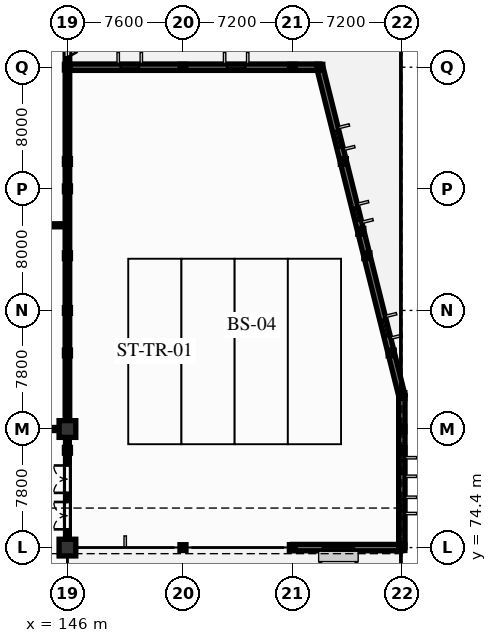
"""IFC4 building model, lengths in metres.
Left out: names, types, materials, properties, quantities, classifications, styles, units other than length and angle.
Written with IfcOpenShell. Run it as: python <this file> out.ifc"""

import sys

from ifc_helpers import new_model, si_unit, direction, frame, frame_2d, origin, origin_2d, place, context, subcontext, project, spatial, rectangle, i_section, extrude, element, fill, save


model = new_model("IFC4")
c1 = context("Model", 3, precision=1e-05, world=origin(), true_north=direction((0.0, 1.0)))
c2 = subcontext(c1, "Body", "Model", "MODEL_VIEW")
j1 = project(units=[si_unit("LENGTHUNIT", "METRE"), si_unit("PLANEANGLEUNIT", "RADIAN")], contexts=[c1])
p1 = place(None, origin())
s1 = spatial("IfcSite", under=j1, at=p1, CompositionType="ELEMENT")
p2 = place(p1, origin())
s2 = spatial("IfcBuilding", under=s1, at=p2, CompositionType="ELEMENT")
p3 = place(p2, origin())
s3 = spatial("IfcBuildingStorey", under=s2, at=p3, CompositionType="ELEMENT", Elevation=0.0)
for number, where, z_axis, x_axis in (
    (1, (146.0, 74.4, 0.0), (0.0, 0.0, 1.0), (1.0, 0.0, 0.0)),
    (2, (146.0, 82.2, 0.0), (0.0, 0.0, 1.0), (1.0, 0.0, 0.0)),
):
    element("IfcColumn", number, at=place(p3, frame(where, z_axis=z_axis, x_axis=x_axis)), inside=s3, PredefinedType="COLUMN", context=c2, shape_type="SweptSolid", body=[
        extrude(rectangle(XDim=1.1, YDim=1.1, at=origin_2d()), origin(), (0.0, 0.0, 1.0), 5.1),
    ])
for number, where, z_axis, x_axis in (
    (3, (146.0, 90.0, 0.0), (0.0, 0.0, 1.0), (1.0, 0.0, 0.0)),
    (4, (146.0, 98.0, 0.0), (0.0, 0.0, 1.0), (1.0, 0.0, 0.0)),
    (5, (146.0, 106.0, 0.0), (0.0, 0.0, 1.0), (1.0, 0.0, 0.0)),
    (6, (153.6, 74.4, 0.0), (0.0, 0.0, 1.0), (1.0, 0.0, 0.0)),
    (7, (153.6, 106.0, 0.0), (0.0, 0.0, 1.0), (1.0, 0.0, 0.0)),
    (8, (160.8, 74.4, 0.0), (0.0, 0.0, 1.0), (1.0, 0.0, 0.0)),
    (9, (160.8, 106.0, 0.0), (0.0, 0.0, 1.0), (1.0, 0.0, 0.0)),
    (10, (162.6, 106.0, 0.0), (0.0, 0.0, 1.0), (1.0, 0.0, 0.0)),
    (11, (165.3, 95.2, 0.0), (0.0, 0.0, 1.0), (1.0, 0.0, 0.0)),
    (12, (168.0, 74.4, 0.0), (0.0, 0.0, 1.0), (1.0, 0.0, 0.0)),
    (13, (168.0, 82.2, 0.0), (0.0, 0.0, 1.0), (1.0, 0.0, 0.0)),
    (14, (168.0, 84.4, 0.0), (0.0, 0.0, 1.0), (1.0, 0.0, 0.0)),
    (15, (146.0, 80.8, 0.0), (0.0, 0.0, 1.0), (1.0, 0.0, 0.0)),
    (16, (168.0, 80.8, 0.0), (0.0, 0.0, 1.0), (1.0, 0.0, 0.0)),
    (17, (146.0, 87.2, 0.0), (0.0, 0.0, 1.0), (1.0, 0.0, 0.0)),
    (18, (167.3, 87.2, 0.0), (0.0, 0.0, 1.0), (1.0, 0.0, 0.0)),
    (19, (146.0, 93.6, 0.0), (0.0, 0.0, 1.0), (1.0, 0.0, 0.0)),
    (20, (165.7, 93.6, 0.0), (0.0, 0.0, 1.0), (1.0, 0.0, 0.0)),
    (21, (146.0, 99.8, 0.0), (0.0, 0.0, 1.0), (1.0, 0.0, 0.0)),
    (22, (164.15, 99.8, 0.0), (0.0, 0.0, 1.0), (1.0, 0.0, 0.0)),
):
    element("IfcColumn", number, at=place(p3, frame(where, z_axis=z_axis, x_axis=x_axis)), inside=s3, PredefinedType="COLUMN", context=c2, shape_type="SweptSolid", body=[
        extrude(i_section(OverallWidth=0.396, OverallDepth=0.381, WebThickness=0.019, FlangeThickness=0.03, at=origin_2d()), origin(), (0.0, 0.0, 1.0), 5.1),
    ])
p4 = place(p3, frame((146.0, 82.2, 0.0), z_axis=(0.0, 0.0, 1.0), x_axis=(0.0, 1.0, 0.0)))
e23 = element("IfcWall", 23, at=p4, inside=s3, PredefinedType="SOLIDWALL", context=c2, shape_type="SweptSolid", body=[
    extrude(rectangle(XDim=31.8, YDim=0.3, at=frame_2d((15.9, 0.0))), origin(), (0.0, 0.0, 1.0), 4.145),
])
p5 = place(p4, frame((24.45, 0.0, 0.0)))
e24 = element("IfcOpeningElement", 24, at=p5, cuts=e23, PredefinedType="OPENING", context=c2, shape_type="SweptSolid", body=[
    extrude(rectangle(XDim=3.2, YDim=3.6, at=frame_2d((1.6, 1.8))), frame((0.0, 0.16, 0.0), z_axis=(0.0, -1.0, 0.0), x_axis=(1.0, 0.0, 0.0)), (0.0, 0.0, 1.0), 0.32),
])
p6 = place(p4, frame((28.0, 0.0, 0.0)))
e25 = element("IfcOpeningElement", 25, at=p6, cuts=e23, PredefinedType="OPENING", context=c2, shape_type="SweptSolid", body=[
    extrude(rectangle(XDim=3.2, YDim=3.6, at=frame_2d((1.6, 1.8))), frame((0.0, 0.16, 0.0), z_axis=(0.0, -1.0, 0.0), x_axis=(1.0, 0.0, 0.0)), (0.0, 0.0, 1.0), 0.32),
])
p7 = place(p3, frame((160.8, 74.4, 0.0), z_axis=(0.0, 0.0, 1.0), x_axis=(1.0, 0.0, 0.0)))
e26 = element("IfcWall", 26, at=p7, inside=s3, PredefinedType="SOLIDWALL", context=c2, shape_type="SweptSolid", body=[
    extrude(rectangle(XDim=7.2, YDim=0.42, at=frame_2d((3.6, 0.0))), origin(), (0.0, 0.0, 1.0), 4.8),
])
p8 = place(p7, frame((2.0, 0.0, 0.9)))
e27 = element("IfcOpeningElement", 27, at=p8, cuts=e26, PredefinedType="OPENING", context=c2, shape_type="SweptSolid", body=[
    extrude(rectangle(XDim=2.05, YDim=1.85, at=frame_2d((1.025, 0.925))), frame((0.0, 0.22, 0.0), z_axis=(0.0, -1.0, 0.0), x_axis=(1.0, 0.0, 0.0)), (0.0, 0.0, 1.0), 0.44),
])
p9 = place(p3, frame((168.0, 74.4, 0.0), z_axis=(0.0, 0.0, 1.0), x_axis=(0.0, 1.0, 0.0)))
e28 = element("IfcWall", 28, at=p9, inside=s3, PredefinedType="SOLIDWALL", context=c2, shape_type="SweptSolid", body=[
    extrude(rectangle(XDim=10.0, YDim=0.42, at=frame_2d((5.0, 0.0))), origin(), (0.0, 0.0, 1.0), 4.8),
])
p10 = place(p9, frame((2.4, 0.0, 1.0)))
e29 = element("IfcOpeningElement", 29, at=p10, cuts=e28, PredefinedType="OPENING", context=c2, shape_type="SweptSolid", body=[
    extrude(rectangle(XDim=0.75, YDim=2.2, at=frame_2d((0.375, 1.1))), frame((0.0, 0.22, 0.0), z_axis=(0.0, -1.0, 0.0), x_axis=(1.0, 0.0, 0.0)), (0.0, 0.0, 1.0), 0.44),
])
p11 = place(p9, frame((4.85, 0.0, 1.0)))
e30 = element("IfcOpeningElement", 30, at=p11, cuts=e28, PredefinedType="OPENING", context=c2, shape_type="SweptSolid", body=[
    extrude(rectangle(XDim=0.9, YDim=2.2, at=frame_2d((0.45, 1.1))), frame((0.0, 0.22, 0.0), z_axis=(0.0, -1.0, 0.0), x_axis=(1.0, 0.0, 0.0)), (0.0, 0.0, 1.0), 0.44),
])
p12 = place(p3, frame((168.0, 84.4, 0.0), z_axis=(0.0, 0.0, 1.0), x_axis=(-0.242530464893, 0.970143790167, 0.0)))
e31 = element("IfcWall", 31, at=p12, inside=s3, PredefinedType="SOLIDWALL", context=c2, shape_type="SweptSolid", body=[
    extrude(rectangle(XDim=22.265, YDim=0.42, at=frame_2d((11.132, 0.0))), origin(), (0.0, 0.0, 1.0), 4.8),
])
p13 = place(p12, frame((4.0, 0.0, 1.0)))
e32 = element("IfcOpeningElement", 32, at=p13, cuts=e31, PredefinedType="OPENING", context=c2, shape_type="SweptSolid", body=[
    extrude(rectangle(XDim=1.15, YDim=2.3, at=frame_2d((0.575, 1.15))), frame((0.0, 0.22, 0.0), z_axis=(0.0, -1.0, 0.0), x_axis=(1.0, 0.0, 0.0)), (0.0, 0.0, 1.0), 0.44),
])
p14 = place(p12, frame((11.85, 0.0, 1.0)))
e33 = element("IfcOpeningElement", 33, at=p14, cuts=e31, PredefinedType="OPENING", context=c2, shape_type="SweptSolid", body=[
    extrude(rectangle(XDim=0.9, YDim=2.2, at=frame_2d((0.45, 1.1))), frame((0.0, 0.22, 0.0), z_axis=(0.0, -1.0, 0.0), x_axis=(1.0, 0.0, 0.0)), (0.0, 0.0, 1.0), 0.44),
])
p15 = place(p12, frame((16.8, 0.0, 1.0)))
e34 = element("IfcOpeningElement", 34, at=p15, cuts=e31, PredefinedType="OPENING", context=c2, shape_type="SweptSolid", body=[
    extrude(rectangle(XDim=1.15, YDim=2.3, at=frame_2d((0.575, 1.15))), frame((0.0, 0.22, 0.0), z_axis=(0.0, -1.0, 0.0), x_axis=(1.0, 0.0, 0.0)), (0.0, 0.0, 1.0), 0.44),
])
p16 = place(p3, frame((146.0, 106.0, 0.0), z_axis=(0.0, 0.0, 1.0), x_axis=(1.0, 0.0, 0.0)))
e35 = element("IfcWall", 35, at=p16, inside=s3, PredefinedType="SOLIDWALL", context=c2, shape_type="SweptSolid", body=[
    extrude(rectangle(XDim=16.6, YDim=0.42, at=frame_2d((8.3, 0.0))), origin(), (0.0, 0.0, 1.0), 4.8),
])
p17 = place(p16, frame((3.5, 0.0, 1.0)))
e36 = element("IfcOpeningElement", 36, at=p17, cuts=e35, PredefinedType="OPENING", context=c2, shape_type="SweptSolid", body=[
    extrude(rectangle(XDim=1.2, YDim=2.1, at=frame_2d((0.6, 1.05))), frame((0.0, 0.22, 0.0), z_axis=(0.0, -1.0, 0.0), x_axis=(1.0, 0.0, 0.0)), (0.0, 0.0, 1.0), 0.44),
])
p18 = place(p16, frame((10.5, 0.0, 1.0)))
e37 = element("IfcOpeningElement", 37, at=p18, cuts=e35, PredefinedType="OPENING", context=c2, shape_type="SweptSolid", body=[
    extrude(rectangle(XDim=1.2, YDim=2.1, at=frame_2d((0.6, 1.05))), frame((0.0, 0.22, 0.0), z_axis=(0.0, -1.0, 0.0), x_axis=(1.0, 0.0, 0.0)), (0.0, 0.0, 1.0), 0.44),
])
p19 = place(p3, frame((115.6, 95.6, 0.0), z_axis=(0.0, 0.0, 1.0), x_axis=(1.0, 0.0, 0.0)))
e38 = element("IfcWall", 38, at=p19, inside=s3, PredefinedType="PARTITIONING", context=c2, shape_type="SweptSolid", body=[
    extrude(rectangle(XDim=30.4, YDim=0.2, at=frame_2d((15.2, 0.0))), origin(), (0.0, 0.0, 1.0), 4.045),
])
p20 = place(p19, frame((6.0, 0.0, 0.0)))
e39 = element("IfcOpeningElement", 39, at=p20, cuts=e38, PredefinedType="OPENING", context=c2, shape_type="SweptSolid", body=[
    extrude(rectangle(XDim=1.6, YDim=2.2, at=frame_2d((0.8, 1.1))), frame((0.0, 0.11, 0.0), z_axis=(0.0, -1.0, 0.0), x_axis=(1.0, 0.0, 0.0)), (0.0, 0.0, 1.0), 0.22),
])
p21 = place(p19, frame((20.0, 0.0, 0.0)))
e40 = element("IfcOpeningElement", 40, at=p21, cuts=e38, PredefinedType="OPENING", context=c2, shape_type="SweptSolid", body=[
    extrude(rectangle(XDim=1.6, YDim=2.2, at=frame_2d((0.8, 1.1))), frame((0.0, 0.11, 0.0), z_axis=(0.0, -1.0, 0.0), x_axis=(1.0, 0.0, 0.0)), (0.0, 0.0, 1.0), 0.22),
])
p22 = place(p3, frame((146.0, 74.4, 0.0), z_axis=(0.0, 0.0, 1.0), x_axis=(0.0, 1.0, 0.0)))
e41 = element("IfcWall", 41, at=p22, inside=s3, PredefinedType="PARTITIONING", context=c2, shape_type="SweptSolid", body=[
    extrude(rectangle(XDim=7.8, YDim=0.25, at=frame_2d((3.9, 0.0))), origin(), (0.0, 0.0, 1.0), 4.308),
])
p23 = place(p22, frame((1.2, 0.0, 0.0)))
e42 = element("IfcOpeningElement", 42, at=p23, cuts=e41, PredefinedType="OPENING", context=c2, shape_type="SweptSolid", body=[
    extrude(rectangle(XDim=1.8, YDim=2.3, at=frame_2d((0.9, 1.15))), frame((0.0, 0.135, 0.0), z_axis=(0.0, -1.0, 0.0), x_axis=(1.0, 0.0, 0.0)), (0.0, 0.0, 1.0), 0.27),
])
p24 = place(p22, frame((3.6, 0.0, 0.0)))
e43 = element("IfcOpeningElement", 43, at=p24, cuts=e41, PredefinedType="OPENING", context=c2, shape_type="SweptSolid", body=[
    extrude(rectangle(XDim=1.8, YDim=2.3, at=frame_2d((0.9, 1.15))), frame((0.0, 0.135, 0.0), z_axis=(0.0, -1.0, 0.0), x_axis=(1.0, 0.0, 0.0)), (0.0, 0.0, 1.0), 0.27),
])
p25 = place(p3, frame((115.6, 82.2, 0.0), z_axis=(0.0, 0.0, 1.0), x_axis=(1.0, 0.0, 0.0)))
e44 = element("IfcWall", 44, at=p25, inside=s3, PredefinedType="PARTITIONING", context=c2, shape_type="SweptSolid", body=[
    extrude(rectangle(XDim=30.4, YDim=0.2, at=frame_2d((15.2, 0.0))), origin(), (0.0, 0.0, 1.0), 4.308),
])
p26 = place(p25, frame((10.2, 0.0, 0.0)))
e45 = element("IfcOpeningElement", 45, at=p26, cuts=e44, PredefinedType="OPENING", context=c2, shape_type="SweptSolid", body=[
    extrude(rectangle(XDim=1.6, YDim=2.2, at=frame_2d((0.8, 1.1))), frame((0.0, 0.11, 0.0), z_axis=(0.0, -1.0, 0.0), x_axis=(1.0, 0.0, 0.0)), (0.0, 0.0, 1.0), 0.22),
])
p27 = place(p5, frame((3.2, 0.0, 0.0), z_axis=(0.0, 0.0, 1.0), x_axis=(-1.0, 0.0, 0.0)))
e46 = element("IfcDoor", 46, at=p27, inside=s3, OperationType="DOUBLE_DOOR_FOLDING", PredefinedType="GATE", context=c2, shape_type="SweptSolid", body=[
    extrude(rectangle(XDim=3.2, YDim=3.6, at=frame_2d((1.6, 1.8))), frame((0.0, 0.025, 0.0), z_axis=(0.0, -1.0, 0.0), x_axis=(1.0, 0.0, 0.0)), (0.0, 0.0, 1.0), 0.05),
])
fill(e24, e46)
p28 = place(p8, origin())
e47 = element("IfcWindow", 47, at=p28, inside=s3, PartitioningType="SINGLE_PANEL", PredefinedType="WINDOW", context=c2, shape_type="SweptSolid", body=[
    extrude(rectangle(XDim=2.05, YDim=1.85, at=frame_2d((1.025, 0.925))), frame((0.0, 0.03, 0.0), z_axis=(0.0, -1.0, 0.0), x_axis=(1.0, 0.0, 0.0)), (0.0, 0.0, 1.0), 0.06),
])
fill(e27, e47)
p29 = place(p10, origin())
e48 = element("IfcWindow", 48, at=p29, inside=s3, PartitioningType="SINGLE_PANEL", PredefinedType="WINDOW", context=c2, shape_type="SweptSolid", body=[
    extrude(rectangle(XDim=0.75, YDim=2.2, at=frame_2d((0.375, 1.1))), frame((0.0, 0.03, 0.0), z_axis=(0.0, -1.0, 0.0), x_axis=(1.0, 0.0, 0.0)), (0.0, 0.0, 1.0), 0.06),
])
fill(e29, e48)
p30 = place(p11, origin())
e49 = element("IfcWindow", 49, at=p30, inside=s3, PartitioningType="SINGLE_PANEL", PredefinedType="WINDOW", context=c2, shape_type="SweptSolid", body=[
    extrude(rectangle(XDim=0.9, YDim=2.2, at=frame_2d((0.45, 1.1))), frame((0.0, 0.03, 0.0), z_axis=(0.0, -1.0, 0.0), x_axis=(1.0, 0.0, 0.0)), (0.0, 0.0, 1.0), 0.06),
])
fill(e30, e49)
p31 = place(p13, origin())
e50 = element("IfcWindow", 50, at=p31, inside=s3, PartitioningType="SINGLE_PANEL", PredefinedType="WINDOW", context=c2, shape_type="SweptSolid", body=[
    extrude(rectangle(XDim=1.15, YDim=2.3, at=frame_2d((0.575, 1.15))), frame((0.0, 0.03, 0.0), z_axis=(0.0, -1.0, 0.0), x_axis=(1.0, 0.0, 0.0)), (0.0, 0.0, 1.0), 0.06),
])
fill(e32, e50)
p32 = place(p14, origin())
e51 = element("IfcWindow", 51, at=p32, inside=s3, PartitioningType="SINGLE_PANEL", PredefinedType="WINDOW", context=c2, shape_type="SweptSolid", body=[
    extrude(rectangle(XDim=0.9, YDim=2.2, at=frame_2d((0.45, 1.1))), frame((0.0, 0.03, 0.0), z_axis=(0.0, -1.0, 0.0), x_axis=(1.0, 0.0, 0.0)), (0.0, 0.0, 1.0), 0.06),
])
fill(e33, e51)
p33 = place(p15, origin())
e52 = element("IfcWindow", 52, at=p33, inside=s3, PartitioningType="SINGLE_PANEL", PredefinedType="WINDOW", context=c2, shape_type="SweptSolid", body=[
    extrude(rectangle(XDim=1.15, YDim=2.3, at=frame_2d((0.575, 1.15))), frame((0.0, 0.03, 0.0), z_axis=(0.0, -1.0, 0.0), x_axis=(1.0, 0.0, 0.0)), (0.0, 0.0, 1.0), 0.06),
])
fill(e34, e52)
p34 = place(p17, origin())
e53 = element("IfcWindow", 53, at=p34, inside=s3, PartitioningType="SINGLE_PANEL", PredefinedType="WINDOW", context=c2, shape_type="SweptSolid", body=[
    extrude(rectangle(XDim=1.2, YDim=2.1, at=frame_2d((0.6, 1.05))), frame((0.0, 0.03, 0.0), z_axis=(0.0, -1.0, 0.0), x_axis=(1.0, 0.0, 0.0)), (0.0, 0.0, 1.0), 0.06),
])
fill(e36, e53)
p35 = place(p18, origin())
e54 = element("IfcWindow", 54, at=p35, inside=s3, PartitioningType="SINGLE_PANEL", PredefinedType="WINDOW", context=c2, shape_type="SweptSolid", body=[
    extrude(rectangle(XDim=1.2, YDim=2.1, at=frame_2d((0.6, 1.05))), frame((0.0, 0.03, 0.0), z_axis=(0.0, -1.0, 0.0), x_axis=(1.0, 0.0, 0.0)), (0.0, 0.0, 1.0), 0.06),
])
fill(e37, e54)
p36 = place(p23, origin())
e55 = element("IfcDoor", 55, at=p36, inside=s3, OperationType="DOUBLE_DOOR_SINGLE_SWING", PredefinedType="DOOR", context=c2, shape_type="SweptSolid", body=[
    extrude(rectangle(XDim=1.8, YDim=2.3, at=frame_2d((0.9, 1.15))), frame((0.0, 0.025, 0.0), z_axis=(0.0, -1.0, 0.0), x_axis=(1.0, 0.0, 0.0)), (0.0, 0.0, 1.0), 0.05),
])
fill(e42, e55)
p37 = place(p24, origin())
e56 = element("IfcDoor", 56, at=p37, inside=s3, OperationType="DOUBLE_DOOR_SINGLE_SWING", PredefinedType="DOOR", context=c2, shape_type="SweptSolid", body=[
    extrude(rectangle(XDim=1.8, YDim=2.3, at=frame_2d((0.9, 1.15))), frame((0.0, 0.025, 0.0), z_axis=(0.0, -1.0, 0.0), x_axis=(1.0, 0.0, 0.0)), (0.0, 0.0, 1.0), 0.05),
])
fill(e43, e56)
save(model, sys.argv[1])
